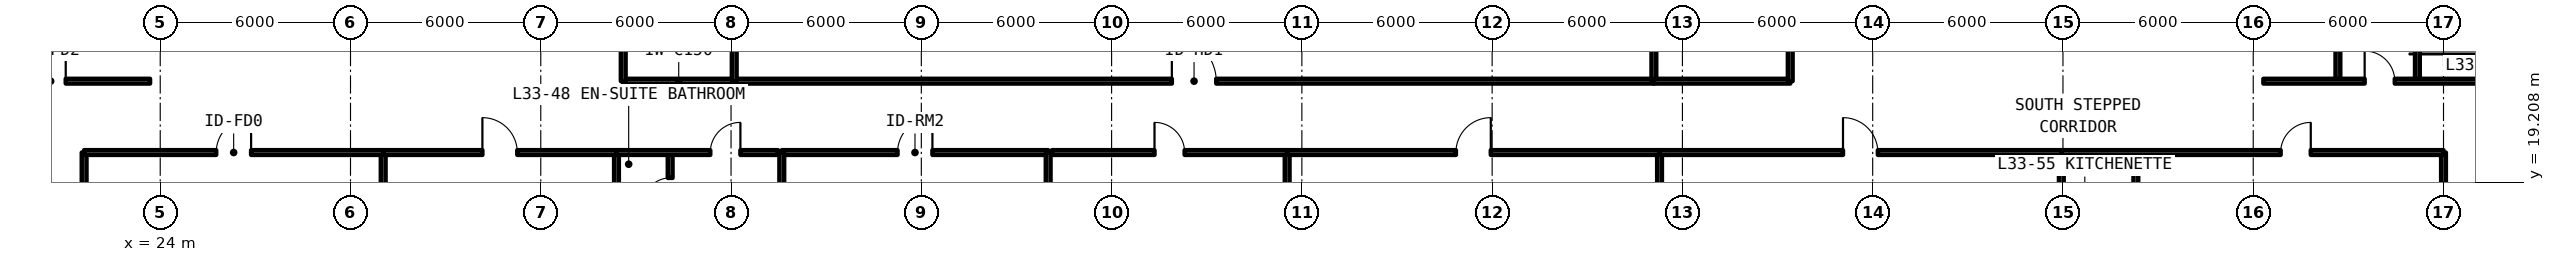
"""IFC4 building model, lengths in metres.
Left out: names, types, materials, properties, quantities, classifications, styles, units other than length and angle.
Written with IfcOpenShell. Run it as: python <this file> out.ifc"""

import sys

from ifc_helpers import new_model, si_unit, direction, frame, frame_2d, origin, place, context, subcontext, project, spatial, rectangle, extrude, element, fill, save


model = new_model("IFC4")
c1 = context("Model", 3, precision=1e-05, world=origin(), true_north=direction((0.0, 1.0)))
c2 = subcontext(c1, "Body", "Model", "MODEL_VIEW")
j1 = project(units=[si_unit("LENGTHUNIT", "METRE"), si_unit("PLANEANGLEUNIT", "RADIAN")], contexts=[c1])
p1 = place(None, origin())
s1 = spatial("IfcSite", under=j1, at=p1, CompositionType="ELEMENT")
p2 = place(p1, origin())
s2 = spatial("IfcBuilding", under=s1, at=p2, CompositionType="ELEMENT")
p3 = place(p2, frame((0.0, 0.0, 119.46)))
s3 = spatial("IfcBuildingStorey", under=s2, at=p3, CompositionType="ELEMENT", Elevation=119.46)
p4 = place(p3, frame((38.6, 22.4, 0.0), z_axis=(0.0, 0.0, 1.0), x_axis=(1.0, 0.0, 0.0)))
e1 = element("IfcWall", 1, at=p4, inside=s3, PredefinedType="SOLIDWALL", context=c2, shape_type="SweptSolid", body=[
    extrude(rectangle(XDim=3.5, YDim=0.15, at=frame_2d((1.75, 0.0))), origin(), (0.0, 0.0, 1.0), 2.57),
])
p5 = place(p3, frame((38.6, 22.4, 0.0), z_axis=(0.0, 0.0, 1.0), x_axis=(0.0, 1.0, 0.0)))
e2 = element("IfcWall", 2, at=p5, inside=s3, PredefinedType="SOLIDWALL", context=c2, shape_type="SweptSolid", body=[
    extrude(rectangle(XDim=9.0, YDim=0.15, at=frame_2d((4.5, 0.0))), origin(), (0.0, 0.0, 1.0), 2.57),
])
p6 = place(p5, frame((4.025, 0.0, 0.0)))
e3 = element("IfcOpeningElement", 3, at=p6, cuts=e2, PredefinedType="OPENING", context=c2, shape_type="SweptSolid", body=[
    extrude(rectangle(XDim=0.95, YDim=2.15, at=frame_2d((0.475, 1.075))), frame((0.0, 0.085, 0.0), z_axis=(0.0, -1.0, 0.0), x_axis=(1.0, 0.0, 0.0)), (0.0, 0.0, 1.0), 0.17),
])
p7 = place(p3, frame((42.1, 22.4, 0.0), z_axis=(0.0, 0.0, 1.0), x_axis=(1.0, 0.0, 0.0)))
e4 = element("IfcWall", 4, at=p7, inside=s3, PredefinedType="SOLIDWALL", context=c2, shape_type="SweptSolid", body=[
    extrude(rectangle(XDim=29.0, YDim=0.15, at=frame_2d((14.5, 0.0))), origin(), (0.0, 0.0, 1.0), 2.57),
])
p8 = place(p7, frame((13.8, 0.0, 0.0)))
e5 = element("IfcOpeningElement", 5, at=p8, cuts=e4, PredefinedType="OPENING", context=c2, shape_type="SweptSolid", body=[
    extrude(rectangle(XDim=1.4, YDim=2.15, at=frame_2d((0.7, 1.075))), frame((0.0, 0.085, 0.0), z_axis=(0.0, -1.0, 0.0), x_axis=(1.0, 0.0, 0.0)), (0.0, 0.0, 1.0), 0.17),
])
for number, where, z_axis, x_axis in (
    (6, (42.1, 22.4, 0.0), (0.0, 0.0, 1.0), (0.0, 1.0, 0.0)),
    (7, (71.1, 22.4, 0.0), (0.0, 0.0, 1.0), (0.0, 1.0, 0.0)),
):
    element("IfcWall", number, at=place(p3, frame(where, z_axis=z_axis, x_axis=x_axis)), inside=s3, PredefinedType="SOLIDWALL", context=c2, shape_type="SweptSolid", body=[
        extrude(rectangle(XDim=22.4, YDim=0.15, at=frame_2d((11.2, 0.0))), origin(), (0.0, 0.0, 1.0), 2.57),
    ])
p9 = place(p3, frame((71.1, 22.4, 0.0), z_axis=(0.0, 0.0, 1.0), x_axis=(1.0, 0.0, 0.0)))
e8 = element("IfcWall", 8, at=p9, inside=s3, PredefinedType="SOLIDWALL", context=c2, shape_type="SweptSolid", body=[
    extrude(rectangle(XDim=4.3, YDim=0.15, at=frame_2d((2.15, 0.0))), origin(), (0.0, 0.0, 1.0), 2.57),
])
p10 = place(p3, frame((75.4, 22.4, 0.0), z_axis=(0.0, 0.0, 1.0), x_axis=(0.0, 1.0, 0.0)))
e9 = element("IfcWall", 9, at=p10, inside=s3, PredefinedType="SOLIDWALL", context=c2, shape_type="SweptSolid", body=[
    extrude(rectangle(XDim=13.2, YDim=0.15, at=frame_2d((6.6, 0.0))), origin(), (0.0, 0.0, 1.0), 2.57),
])
p11 = place(p10, frame((6.125, 0.0, 0.0)))
e10 = element("IfcOpeningElement", 10, at=p11, cuts=e9, PredefinedType="OPENING", context=c2, shape_type="SweptSolid", body=[
    extrude(rectangle(XDim=0.95, YDim=2.15, at=frame_2d((0.475, 1.075))), frame((0.0, 0.085, 0.0), z_axis=(0.0, -1.0, 0.0), x_axis=(1.0, 0.0, 0.0)), (0.0, 0.0, 1.0), 0.17),
])
p12 = place(p3, frame((17.41, 22.4, 0.0), z_axis=(0.0, 0.0, 1.0), x_axis=(1.0, 0.0, 0.0)))
e11 = element("IfcWall", 11, at=p12, inside=s3, PredefinedType="SOLIDWALL", context=c2, shape_type="SweptSolid", body=[
    extrude(rectangle(XDim=6.27, YDim=0.15, at=frame_2d((3.135, 0.0))), origin(), (0.0, 0.0, 1.0), 2.57),
])
p13 = place(p12, frame((2.66, 0.0, 0.0)))
e12 = element("IfcOpeningElement", 12, at=p13, cuts=e11, PredefinedType="OPENING", context=c2, shape_type="SweptSolid", body=[
    extrude(rectangle(XDim=0.95, YDim=2.15, at=frame_2d((0.475, 1.075))), frame((0.0, 0.085, 0.0), z_axis=(0.0, -1.0, 0.0), x_axis=(1.0, 0.0, 0.0)), (0.0, 0.0, 1.0), 0.17),
])
p14 = place(p3, frame((95.177, 22.4, 0.0), z_axis=(0.0, 0.0, 1.0), x_axis=(0.0, 1.0, 0.0)))
e13 = element("IfcWall", 13, at=p14, inside=s3, PredefinedType="PARTITIONING", context=c2, shape_type="SweptSolid", body=[
    extrude(rectangle(XDim=17.2, YDim=0.15, at=frame_2d((8.6, 0.0))), origin(), (0.0, 0.0, 1.0), 2.57),
])
p15 = place(p14, frame((8.175, 0.0, 0.0)))
e14 = element("IfcOpeningElement", 14, at=p15, cuts=e13, PredefinedType="OPENING", context=c2, shape_type="SweptSolid", body=[
    extrude(rectangle(XDim=0.85, YDim=2.1, at=frame_2d((0.425, 1.05))), frame((0.0, 0.085, 0.0), z_axis=(0.0, -1.0, 0.0), x_axis=(1.0, 0.0, 0.0)), (0.0, 0.0, 1.0), 0.17),
])
p16 = place(p3, frame((92.67, 22.4, 0.0), z_axis=(0.0, 0.0, 1.0), x_axis=(0.0, 1.0, 0.0)))
e15 = element("IfcWall", 15, at=p16, inside=s3, PredefinedType="PARTITIONING", context=c2, shape_type="SweptSolid", body=[
    extrude(rectangle(XDim=17.2, YDim=0.15, at=frame_2d((8.6, 0.0))), origin(), (0.0, 0.0, 1.0), 2.57),
])
p17 = place(p16, frame((4.649, 0.0, 0.0)))
e16 = element("IfcOpeningElement", 16, at=p17, cuts=e15, PredefinedType="OPENING", context=c2, shape_type="SweptSolid", body=[
    extrude(rectangle(XDim=0.85, YDim=2.1, at=frame_2d((0.425, 1.05))), frame((0.0, 0.085, 0.0), z_axis=(0.0, -1.0, 0.0), x_axis=(1.0, 0.0, 0.0)), (0.0, 0.0, 1.0), 0.17),
])
p18 = place(p16, frame((13.249, 0.0, 0.0)))
e17 = element("IfcOpeningElement", 17, at=p18, cuts=e15, PredefinedType="OPENING", context=c2, shape_type="SweptSolid", body=[
    extrude(rectangle(XDim=0.85, YDim=2.1, at=frame_2d((0.425, 1.05))), frame((0.0, 0.085, 0.0), z_axis=(0.0, -1.0, 0.0), x_axis=(1.0, 0.0, 0.0)), (0.0, 0.0, 1.0), 0.17),
])
p19 = place(p3, frame((90.32, 22.4, 0.0), z_axis=(0.0, 0.0, 1.0), x_axis=(1.0, 0.0, 0.0)))
e18 = element("IfcWall", 18, at=p19, inside=s3, PredefinedType="SOLIDWALL", context=c2, shape_type="SweptSolid", body=[
    extrude(rectangle(XDim=9.87, YDim=0.15, at=frame_2d((4.935, 0.0))), origin(), (0.0, 0.0, 1.0), 2.57),
])
p20 = place(p19, frame((3.193, 0.0, 0.0)))
e19 = element("IfcOpeningElement", 19, at=p20, cuts=e18, PredefinedType="OPENING", context=c2, shape_type="SweptSolid", body=[
    extrude(rectangle(XDim=0.95, YDim=2.15, at=frame_2d((0.475, 1.075))), frame((0.0, 0.085, 0.0), z_axis=(0.0, -1.0, 0.0), x_axis=(1.0, 0.0, 0.0)), (0.0, 0.0, 1.0), 0.17),
])
p21 = place(p3, frame((43.6, 20.15, 0.0), z_axis=(0.0, 0.0, 1.0), x_axis=(1.0, 0.0, 0.0)))
e20 = element("IfcWall", 20, at=p21, inside=s3, PredefinedType="SOLIDWALL", context=c2, shape_type="SweptSolid", body=[
    extrude(rectangle(XDim=8.4, YDim=0.15, at=frame_2d((4.2, 0.0))), origin(), (0.0, 0.0, 1.0), 2.57),
])
p22 = place(p21, frame((3.65, 0.0, 0.0)))
e21 = element("IfcOpeningElement", 21, at=p22, cuts=e20, PredefinedType="OPENING", context=c2, shape_type="SweptSolid", body=[
    extrude(rectangle(XDim=1.1, YDim=2.15, at=frame_2d((0.55, 1.075))), frame((0.0, 0.085, 0.0), z_axis=(0.0, -1.0, 0.0), x_axis=(1.0, 0.0, 0.0)), (0.0, 0.0, 1.0), 0.17),
])
for number, where, z_axis, x_axis in (
    (22, (43.6, 9.85, 0.0), (0.0, 0.0, 1.0), (0.0, 1.0, 0.0)),
    (23, (52.0, 9.85, 0.0), (0.0, 0.0, 1.0), (0.0, 1.0, 0.0)),
    (24, (21.6, 9.85, 0.0), (0.0, 0.0, 1.0), (0.0, 1.0, 0.0)),
    (25, (31.031, 9.85, 0.0), (0.0, 0.0, 1.0), (0.0, 1.0, 0.0)),
):
    element("IfcWall", number, at=place(p3, frame(where, z_axis=z_axis, x_axis=x_axis)), inside=s3, PredefinedType="SOLIDWALL", context=c2, shape_type="SweptSolid", body=[
        extrude(rectangle(XDim=10.3, YDim=0.15, at=frame_2d((5.15, 0.0))), origin(), (0.0, 0.0, 1.0), 2.57),
    ])
p23 = place(p3, frame((21.6, 20.15, 0.0), z_axis=(0.0, 0.0, 1.0), x_axis=(1.0, 0.0, 0.0)))
e26 = element("IfcWall", 26, at=p23, inside=s3, PredefinedType="SOLIDWALL", context=c2, shape_type="SweptSolid", body=[
    extrude(rectangle(XDim=9.431, YDim=0.15, at=frame_2d((4.715, 0.0))), origin(), (0.0, 0.0, 1.0), 2.57),
])
p24 = place(p23, frame((4.166, 0.0, 0.0)))
e27 = element("IfcOpeningElement", 27, at=p24, cuts=e26, PredefinedType="OPENING", context=c2, shape_type="SweptSolid", body=[
    extrude(rectangle(XDim=1.1, YDim=2.15, at=frame_2d((0.55, 1.075))), frame((0.0, 0.085, 0.0), z_axis=(0.0, -1.0, 0.0), x_axis=(1.0, 0.0, 0.0)), (0.0, 0.0, 1.0), 0.17),
])
p25 = place(p3, frame((38.387, 9.85, 0.0), z_axis=(0.0, 0.0, 1.0), x_axis=(0.0, 1.0, 0.0)))
e28 = element("IfcWall", 28, at=p25, inside=s3, PredefinedType="SOLIDWALL", context=c2, shape_type="SweptSolid", body=[
    extrude(rectangle(XDim=10.3, YDim=0.15, at=frame_2d((5.15, 0.0))), origin(), (0.0, 0.0, 1.0), 2.57),
])
p26 = place(p3, frame((31.031, 20.15, 0.0), z_axis=(0.0, 0.0, 1.0), x_axis=(1.0, 0.0, 0.0)))
e29 = element("IfcWall", 29, at=p26, inside=s3, PredefinedType="SOLIDWALL", context=c2, shape_type="SweptSolid", body=[
    extrude(rectangle(XDim=7.356, YDim=0.15, at=frame_2d((3.678, 0.0))), origin(), (0.0, 0.0, 1.0), 2.57),
])
p27 = place(p26, frame((3.128, 0.0, 0.0)))
e30 = element("IfcOpeningElement", 30, at=p27, cuts=e29, PredefinedType="OPENING", context=c2, shape_type="SweptSolid", body=[
    extrude(rectangle(XDim=1.1, YDim=2.15, at=frame_2d((0.55, 1.075))), frame((0.0, 0.085, 0.0), z_axis=(0.0, -1.0, 0.0), x_axis=(1.0, 0.0, 0.0)), (0.0, 0.0, 1.0), 0.17),
])
p28 = place(p3, frame((40.08, 9.85, 0.0), z_axis=(0.0, 0.0, 1.0), x_axis=(0.0, 1.0, 0.0)))
e31 = element("IfcWall", 31, at=p28, inside=s3, PredefinedType="PARTITIONING", context=c2, shape_type="SweptSolid", body=[
    extrude(rectangle(XDim=10.3, YDim=0.15, at=frame_2d((5.15, 0.0))), origin(), (0.0, 0.0, 1.0), 2.57),
])
p29 = place(p28, frame((3.0, 0.0, 0.0)))
e32 = element("IfcOpeningElement", 32, at=p29, cuts=e31, PredefinedType="OPENING", context=c2, shape_type="SweptSolid", body=[
    extrude(rectangle(XDim=0.85, YDim=2.1, at=frame_2d((0.425, 1.05))), frame((0.0, 0.085, 0.0), z_axis=(0.0, -1.0, 0.0), x_axis=(1.0, 0.0, 0.0)), (0.0, 0.0, 1.0), 0.17),
])
p30 = place(p28, frame((8.65, 0.0, 0.0)))
e33 = element("IfcOpeningElement", 33, at=p30, cuts=e31, PredefinedType="OPENING", context=c2, shape_type="SweptSolid", body=[
    extrude(rectangle(XDim=0.85, YDim=2.1, at=frame_2d((0.425, 1.05))), frame((0.0, 0.085, 0.0), z_axis=(0.0, -1.0, 0.0), x_axis=(1.0, 0.0, 0.0)), (0.0, 0.0, 1.0), 0.17),
])
p31 = place(p3, frame((38.387, 20.15, 0.0), z_axis=(0.0, 0.0, 1.0), x_axis=(1.0, 0.0, 0.0)))
e34 = element("IfcWall", 34, at=p31, inside=s3, PredefinedType="SOLIDWALL", context=c2, shape_type="SweptSolid", body=[
    extrude(rectangle(XDim=5.093, YDim=0.15, at=frame_2d((2.546, 0.0))), origin(), (0.0, 0.0, 1.0), 2.57),
])
p32 = place(p31, frame((2.958, 0.0, 0.0)))
e35 = element("IfcOpeningElement", 35, at=p32, cuts=e34, PredefinedType="OPENING", context=c2, shape_type="SweptSolid", body=[
    extrude(rectangle(XDim=0.95, YDim=2.15, at=frame_2d((0.475, 1.075))), frame((0.0, 0.085, 0.0), z_axis=(0.0, -1.0, 0.0), x_axis=(1.0, 0.0, 0.0)), (0.0, 0.0, 1.0), 0.17),
])
for number, where, z_axis, x_axis in (
    (36, (96.0, 9.85, 0.0), (0.0, 0.0, 1.0), (0.0, 1.0, 0.0)),
    (37, (59.536, 9.85, 0.0), (0.0, 0.0, 1.0), (0.0, 1.0, 0.0)),
):
    element("IfcWall", number, at=place(p3, frame(where, z_axis=z_axis, x_axis=x_axis)), inside=s3, PredefinedType="SOLIDWALL", context=c2, shape_type="SweptSolid", body=[
        extrude(rectangle(XDim=10.3, YDim=0.15, at=frame_2d((5.15, 0.0))), origin(), (0.0, 0.0, 1.0), 2.57),
    ])
p33 = place(p3, frame((52.12, 20.15, 0.0), z_axis=(0.0, 0.0, 1.0), x_axis=(1.0, 0.0, 0.0)))
e38 = element("IfcWall", 38, at=p33, inside=s3, PredefinedType="SOLIDWALL", context=c2, shape_type="SweptSolid", body=[
    extrude(rectangle(XDim=7.416, YDim=0.15, at=frame_2d((3.708, 0.0))), origin(), (0.0, 0.0, 1.0), 2.57),
])
p34 = place(p33, frame((3.233, 0.0, 0.0)))
e39 = element("IfcOpeningElement", 39, at=p34, cuts=e38, PredefinedType="OPENING", context=c2, shape_type="SweptSolid", body=[
    extrude(rectangle(XDim=0.95, YDim=2.15, at=frame_2d((0.475, 1.075))), frame((0.0, 0.085, 0.0), z_axis=(0.0, -1.0, 0.0), x_axis=(1.0, 0.0, 0.0)), (0.0, 0.0, 1.0), 0.17),
])
p35 = place(p3, frame((71.279, 9.85, 0.0), z_axis=(0.0, 0.0, 1.0), x_axis=(0.0, 1.0, 0.0)))
e40 = element("IfcWall", 40, at=p35, inside=s3, PredefinedType="SOLIDWALL", context=c2, shape_type="SweptSolid", body=[
    extrude(rectangle(XDim=10.3, YDim=0.15, at=frame_2d((5.15, 0.0))), origin(), (0.0, 0.0, 1.0), 2.57),
])
p36 = place(p3, frame((59.536, 20.15, 0.0), z_axis=(0.0, 0.0, 1.0), x_axis=(1.0, 0.0, 0.0)))
e41 = element("IfcWall", 41, at=p36, inside=s3, PredefinedType="SOLIDWALL", context=c2, shape_type="SweptSolid", body=[
    extrude(rectangle(XDim=11.742, YDim=0.15, at=frame_2d((5.871, 0.0))), origin(), (0.0, 0.0, 1.0), 2.57),
])
p37 = place(p36, frame((5.321, 0.0, 0.0)))
e42 = element("IfcOpeningElement", 42, at=p37, cuts=e41, PredefinedType="OPENING", context=c2, shape_type="SweptSolid", body=[
    extrude(rectangle(XDim=1.1, YDim=2.15, at=frame_2d((0.55, 1.075))), frame((0.0, 0.085, 0.0), z_axis=(0.0, -1.0, 0.0), x_axis=(1.0, 0.0, 0.0)), (0.0, 0.0, 1.0), 0.17),
])
p38 = place(p3, frame((83.948, 9.85, 0.0), z_axis=(0.0, 0.0, 1.0), x_axis=(0.0, 1.0, 0.0)))
e43 = element("IfcWall", 43, at=p38, inside=s3, PredefinedType="SOLIDWALL", context=c2, shape_type="SweptSolid", body=[
    extrude(rectangle(XDim=10.3, YDim=0.15, at=frame_2d((5.15, 0.0))), origin(), (0.0, 0.0, 1.0), 2.57),
])
p39 = place(p3, frame((71.279, 20.15, 0.0), z_axis=(0.0, 0.0, 1.0), x_axis=(1.0, 0.0, 0.0)))
e44 = element("IfcWall", 44, at=p39, inside=s3, PredefinedType="SOLIDWALL", context=c2, shape_type="SweptSolid", body=[
    extrude(rectangle(XDim=12.67, YDim=0.15, at=frame_2d((6.335, 0.0))), origin(), (0.0, 0.0, 1.0), 2.57),
])
p40 = place(p39, frame((5.785, 0.0, 0.0)))
e45 = element("IfcOpeningElement", 45, at=p40, cuts=e44, PredefinedType="OPENING", context=c2, shape_type="SweptSolid", body=[
    extrude(rectangle(XDim=1.1, YDim=2.15, at=frame_2d((0.55, 1.075))), frame((0.0, 0.085, 0.0), z_axis=(0.0, -1.0, 0.0), x_axis=(1.0, 0.0, 0.0)), (0.0, 0.0, 1.0), 0.17),
])
p41 = place(p3, frame((86.298, 14.557, 0.0), z_axis=(0.0, 0.0, 1.0), x_axis=(0.0, 1.0, 0.0)))
e46 = element("IfcWall", 46, at=p41, inside=s3, PredefinedType="PARTITIONING", context=c2, shape_type="SweptSolid", body=[
    extrude(rectangle(XDim=5.593, YDim=0.15, at=frame_2d((2.796, 0.0))), origin(), (0.0, 0.0, 1.0), 2.57),
])
p42 = place(p41, frame((0.721, 0.0, 0.0)))
e47 = element("IfcOpeningElement", 47, at=p42, cuts=e46, PredefinedType="OPENING", context=c2, shape_type="SweptSolid", body=[
    extrude(rectangle(XDim=0.85, YDim=2.1, at=frame_2d((0.425, 1.05))), frame((0.0, 0.085, 0.0), z_axis=(0.0, -1.0, 0.0), x_axis=(1.0, 0.0, 0.0)), (0.0, 0.0, 1.0), 0.17),
])
p43 = place(p41, frame((3.518, 0.0, 0.0)))
e48 = element("IfcOpeningElement", 48, at=p43, cuts=e46, PredefinedType="OPENING", context=c2, shape_type="SweptSolid", body=[
    extrude(rectangle(XDim=0.85, YDim=2.1, at=frame_2d((0.425, 1.05))), frame((0.0, 0.085, 0.0), z_axis=(0.0, -1.0, 0.0), x_axis=(1.0, 0.0, 0.0)), (0.0, 0.0, 1.0), 0.17),
])
p44 = place(p3, frame((83.948, 20.15, 0.0), z_axis=(0.0, 0.0, 1.0), x_axis=(1.0, 0.0, 0.0)))
e49 = element("IfcWall", 49, at=p44, inside=s3, PredefinedType="SOLIDWALL", context=c2, shape_type="SweptSolid", body=[
    extrude(rectangle(XDim=12.052, YDim=0.15, at=frame_2d((6.026, 0.0))), origin(), (0.0, 0.0, 1.0), 2.57),
])
p45 = place(p44, frame((6.916, 0.0, 0.0)))
e50 = element("IfcOpeningElement", 50, at=p45, cuts=e49, PredefinedType="OPENING", context=c2, shape_type="SweptSolid", body=[
    extrude(rectangle(XDim=0.95, YDim=2.15, at=frame_2d((0.475, 1.075))), frame((0.0, 0.085, 0.0), z_axis=(0.0, -1.0, 0.0), x_axis=(1.0, 0.0, 0.0)), (0.0, 0.0, 1.0), 0.17),
])
p46 = place(p8, origin())
e51 = element("IfcDoor", 51, at=p46, inside=s3, OperationType="SINGLE_SWING_LEFT", PredefinedType="DOOR", context=c2, shape_type="SweptSolid", body=[
    extrude(rectangle(XDim=1.4, YDim=2.15, at=frame_2d((0.7, 1.075))), frame((0.0, 0.025, 0.0), z_axis=(0.0, -1.0, 0.0), x_axis=(1.0, 0.0, 0.0)), (0.0, 0.0, 1.0), 0.05),
])
fill(e5, e51)
p47 = place(p13, origin())
e52 = element("IfcDoor", 52, at=p47, inside=s3, OperationType="SINGLE_SWING_RIGHT", PredefinedType="DOOR", context=c2, shape_type="SweptSolid", body=[
    extrude(rectangle(XDim=0.95, YDim=2.15, at=frame_2d((0.475, 1.075))), frame((0.0, 0.025, 0.0), z_axis=(0.0, -1.0, 0.0), x_axis=(1.0, 0.0, 0.0)), (0.0, 0.0, 1.0), 0.05),
])
fill(e12, e52)
p48 = place(p20, origin())
e53 = element("IfcDoor", 53, at=p48, inside=s3, OperationType="SINGLE_SWING_LEFT", PredefinedType="DOOR", context=c2, shape_type="SweptSolid", body=[
    extrude(rectangle(XDim=0.95, YDim=2.15, at=frame_2d((0.475, 1.075))), frame((0.0, 0.025, 0.0), z_axis=(0.0, -1.0, 0.0), x_axis=(1.0, 0.0, 0.0)), (0.0, 0.0, 1.0), 0.05),
])
fill(e19, e53)
p49 = place(p22, origin())
e54 = element("IfcDoor", 54, at=p49, inside=s3, OperationType="SINGLE_SWING_RIGHT", PredefinedType="DOOR", context=c2, shape_type="SweptSolid", body=[
    extrude(rectangle(XDim=1.1, YDim=2.15, at=frame_2d((0.55, 1.075))), frame((0.0, 0.025, 0.0), z_axis=(0.0, -1.0, 0.0), x_axis=(1.0, 0.0, 0.0)), (0.0, 0.0, 1.0), 0.05),
])
fill(e21, e54)
p50 = place(p24, origin())
e55 = element("IfcDoor", 55, at=p50, inside=s3, OperationType="SINGLE_SWING_RIGHT", PredefinedType="DOOR", context=c2, shape_type="SweptSolid", body=[
    extrude(rectangle(XDim=1.1, YDim=2.15, at=frame_2d((0.55, 1.075))), frame((0.0, 0.025, 0.0), z_axis=(0.0, -1.0, 0.0), x_axis=(1.0, 0.0, 0.0)), (0.0, 0.0, 1.0), 0.05),
])
fill(e27, e55)
p51 = place(p27, origin())
e56 = element("IfcDoor", 56, at=p51, inside=s3, OperationType="SINGLE_SWING_LEFT", PredefinedType="DOOR", context=c2, shape_type="SweptSolid", body=[
    extrude(rectangle(XDim=1.1, YDim=2.15, at=frame_2d((0.55, 1.075))), frame((0.0, 0.025, 0.0), z_axis=(0.0, -1.0, 0.0), x_axis=(1.0, 0.0, 0.0)), (0.0, 0.0, 1.0), 0.05),
])
fill(e30, e56)
p52 = place(p30, origin())
e57 = element("IfcDoor", 57, at=p52, inside=s3, OperationType="SINGLE_SWING_LEFT", PredefinedType="DOOR", context=c2, shape_type="SweptSolid", body=[
    extrude(rectangle(XDim=0.85, YDim=2.1, at=frame_2d((0.425, 1.05))), frame((0.0, 0.025, 0.0), z_axis=(0.0, -1.0, 0.0), x_axis=(1.0, 0.0, 0.0)), (0.0, 0.0, 1.0), 0.05),
])
fill(e33, e57)
p53 = place(p32, origin())
e58 = element("IfcDoor", 58, at=p53, inside=s3, OperationType="SINGLE_SWING_RIGHT", PredefinedType="DOOR", context=c2, shape_type="SweptSolid", body=[
    extrude(rectangle(XDim=0.95, YDim=2.15, at=frame_2d((0.475, 1.075))), frame((0.0, 0.025, 0.0), z_axis=(0.0, -1.0, 0.0), x_axis=(1.0, 0.0, 0.0)), (0.0, 0.0, 1.0), 0.05),
])
fill(e35, e58)
p54 = place(p34, origin())
e59 = element("IfcDoor", 59, at=p54, inside=s3, OperationType="SINGLE_SWING_LEFT", PredefinedType="DOOR", context=c2, shape_type="SweptSolid", body=[
    extrude(rectangle(XDim=0.95, YDim=2.15, at=frame_2d((0.475, 1.075))), frame((0.0, 0.025, 0.0), z_axis=(0.0, -1.0, 0.0), x_axis=(1.0, 0.0, 0.0)), (0.0, 0.0, 1.0), 0.05),
])
fill(e39, e59)
p55 = place(p37, origin())
e60 = element("IfcDoor", 60, at=p55, inside=s3, OperationType="SINGLE_SWING_RIGHT", PredefinedType="DOOR", context=c2, shape_type="SweptSolid", body=[
    extrude(rectangle(XDim=1.1, YDim=2.15, at=frame_2d((0.55, 1.075))), frame((0.0, 0.025, 0.0), z_axis=(0.0, -1.0, 0.0), x_axis=(1.0, 0.0, 0.0)), (0.0, 0.0, 1.0), 0.05),
])
fill(e42, e60)
p56 = place(p40, origin())
e61 = element("IfcDoor", 61, at=p56, inside=s3, OperationType="SINGLE_SWING_LEFT", PredefinedType="DOOR", context=c2, shape_type="SweptSolid", body=[
    extrude(rectangle(XDim=1.1, YDim=2.15, at=frame_2d((0.55, 1.075))), frame((0.0, 0.025, 0.0), z_axis=(0.0, -1.0, 0.0), x_axis=(1.0, 0.0, 0.0)), (0.0, 0.0, 1.0), 0.05),
])
fill(e45, e61)
p57 = place(p45, origin())
e62 = element("IfcDoor", 62, at=p57, inside=s3, OperationType="SINGLE_SWING_RIGHT", PredefinedType="DOOR", context=c2, shape_type="SweptSolid", body=[
    extrude(rectangle(XDim=0.95, YDim=2.15, at=frame_2d((0.475, 1.075))), frame((0.0, 0.025, 0.0), z_axis=(0.0, -1.0, 0.0), x_axis=(1.0, 0.0, 0.0)), (0.0, 0.0, 1.0), 0.05),
])
fill(e50, e62)
save(model, sys.argv[1])
